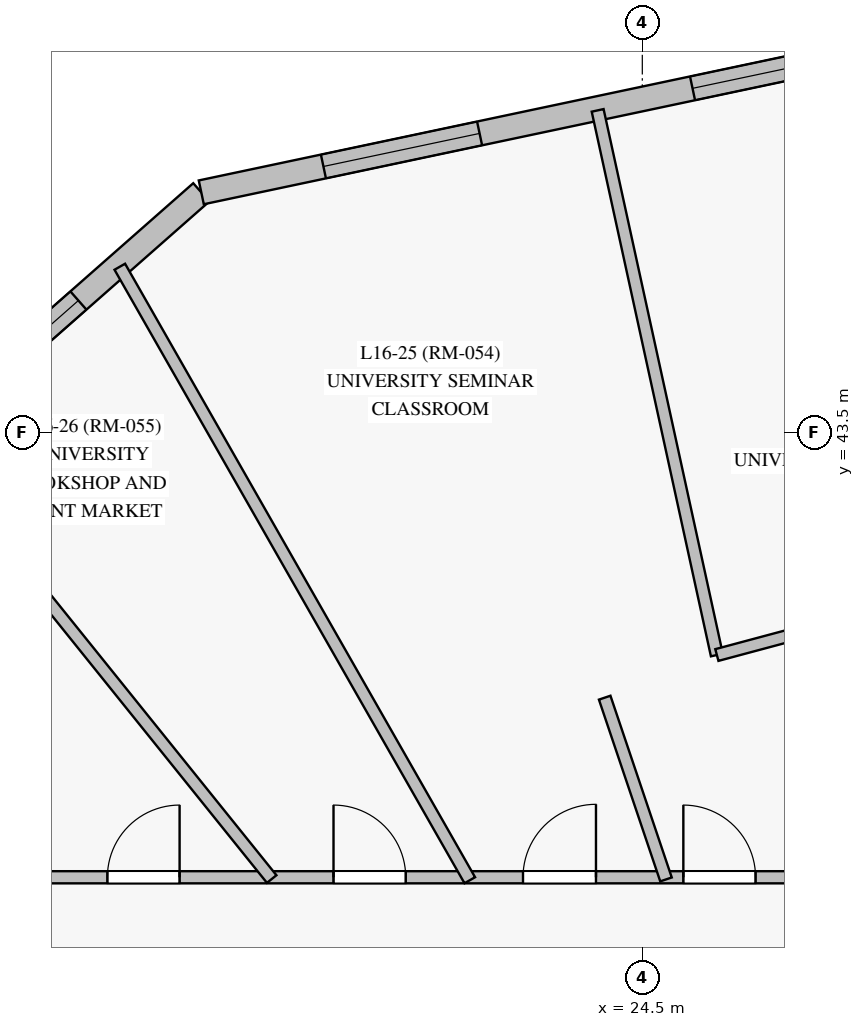
"""IFC4 building model, lengths in metres.
Left out: names, types, materials, properties, quantities, classifications, styles, units other than length and angle.
Written with IfcOpenShell. Run it as: python <this file> out.ifc"""

import sys

from ifc_helpers import new_model, si_unit, direction, frame, frame_2d, origin, origin_with_axes, place, context, subcontext, project, spatial, rectangle, extrude, source, transform, mapped, element, fill, save


model = new_model("IFC4")
c1 = context("Model", 3, precision=1e-05, world=origin(), true_north=direction((0.0, 1.0)))
c2 = subcontext(c1, "Body", "Model", "MODEL_VIEW")
j1 = project(units=[si_unit("LENGTHUNIT", "METRE"), si_unit("PLANEANGLEUNIT", "RADIAN")], contexts=[c1])
p1 = place(None, origin())
s1 = spatial("IfcSite", under=j1, at=p1, CompositionType="ELEMENT")
p2 = place(p1, origin())
s2 = spatial("IfcBuilding", under=s1, at=p2, CompositionType="ELEMENT")
p3 = place(p2, frame((0.0, 0.0, 62.5)))
s3 = spatial("IfcBuildingStorey", under=s2, at=p3, CompositionType="ELEMENT", Elevation=62.5)
p4 = place(p3, frame((18.698, 46.661, 0.0), z_axis=(0.0, 0.0, 1.0), x_axis=(-0.750570189691, -0.66079073113, 0.0)))
e1 = element("IfcWall", 1, at=p4, inside=s3, PredefinedType="SOLIDWALL", context=c2, shape_type="SweptSolid", body=[
    extrude(rectangle(XDim=11.93, YDim=0.32, at=frame_2d((5.965, 0.0))), origin(), (0.0, 0.0, 1.0), 3.35),
])
p5 = place(p4, frame((2.154, 0.0, 0.85)))
e2 = element("IfcOpeningElement", 2, at=p5, cuts=e1, PredefinedType="OPENING", context=c2, shape_type="SweptSolid", body=[
    extrude(rectangle(XDim=2.1, YDim=1.95, at=frame_2d((1.05, 0.975))), frame((0.0, 0.17, 0.0), z_axis=(0.0, -1.0, 0.0), x_axis=(1.0, 0.0, 0.0)), (0.0, 0.0, 1.0), 0.34),
])
p6 = place(p4, frame((7.36, 0.0, 0.85)))
e3 = element("IfcOpeningElement", 3, at=p6, cuts=e1, PredefinedType="OPENING", context=c2, shape_type="SweptSolid", body=[
    extrude(rectangle(XDim=2.1, YDim=1.95, at=frame_2d((1.05, 0.975))), frame((0.0, 0.17, 0.0), z_axis=(0.0, -1.0, 0.0), x_axis=(1.0, 0.0, 0.0)), (0.0, 0.0, 1.0), 0.34),
])
p7 = place(p3, frame((33.236, 49.739, 0.0), z_axis=(0.0, 0.0, 1.0), x_axis=(-0.9783201392, -0.207098298485, 0.0)))
e4 = element("IfcWall", 4, at=p7, inside=s3, PredefinedType="SOLIDWALL", context=c2, shape_type="SweptSolid", body=[
    extrude(rectangle(XDim=14.861, YDim=0.32, at=frame_2d((7.43, 0.0))), origin(), (0.0, 0.0, 1.0), 3.35),
])
p8 = place(p7, frame((2.133, 0.0, 0.85)))
e5 = element("IfcOpeningElement", 5, at=p8, cuts=e4, PredefinedType="OPENING", context=c2, shape_type="SweptSolid", body=[
    extrude(rectangle(XDim=2.1, YDim=1.95, at=frame_2d((1.05, 0.975))), frame((0.0, 0.17, 0.0), z_axis=(0.0, -1.0, 0.0), x_axis=(1.0, 0.0, 0.0)), (0.0, 0.0, 1.0), 0.34),
])
p9 = place(p7, frame((6.155, 0.0, 0.85)))
e6 = element("IfcOpeningElement", 6, at=p9, cuts=e4, PredefinedType="OPENING", context=c2, shape_type="SweptSolid", body=[
    extrude(rectangle(XDim=2.1, YDim=1.95, at=frame_2d((1.05, 0.975))), frame((0.0, 0.17, 0.0), z_axis=(0.0, -1.0, 0.0), x_axis=(1.0, 0.0, 0.0)), (0.0, 0.0, 1.0), 0.34),
])
p10 = place(p7, frame((11.118, 0.0, 0.85)))
e7 = element("IfcOpeningElement", 7, at=p10, cuts=e4, PredefinedType="OPENING", context=c2, shape_type="SweptSolid", body=[
    extrude(rectangle(XDim=2.1, YDim=1.95, at=frame_2d((1.05, 0.975))), frame((0.0, 0.17, 0.0), z_axis=(0.0, -1.0, 0.0), x_axis=(1.0, 0.0, 0.0)), (0.0, 0.0, 1.0), 0.34),
])
p11 = place(p3, frame((10.5, 37.65, 0.0), z_axis=(0.0, 0.0, 1.0), x_axis=(1.0, 0.0, 0.0)))
e8 = element("IfcWall", 8, at=p11, inside=s3, PredefinedType="PARTITIONING", context=c2, shape_type="SweptSolid", body=[
    extrude(rectangle(XDim=29.75, YDim=0.16, at=frame_2d((14.875, 0.0))), origin(), (0.0, 0.0, 1.0), 2.75),
])
p12 = place(p11, frame((27.99, 0.0, 0.0)))
e9 = element("IfcOpeningElement", 9, at=p12, cuts=e8, PredefinedType="OPENING", context=c2, shape_type="SweptSolid", body=[
    extrude(rectangle(XDim=0.96, YDim=2.15, at=frame_2d((0.48, 1.075))), frame((0.0, 0.09, 0.0), z_axis=(0.0, -1.0, 0.0), x_axis=(1.0, 0.0, 0.0)), (0.0, 0.0, 1.0), 0.18),
])
p13 = place(p11, frame((25.342, 0.0, 0.0)))
e10 = element("IfcOpeningElement", 10, at=p13, cuts=e8, PredefinedType="OPENING", context=c2, shape_type="SweptSolid", body=[
    extrude(rectangle(XDim=0.95, YDim=2.15, at=frame_2d((0.475, 1.075))), frame((0.0, 0.09, 0.0), z_axis=(0.0, -1.0, 0.0), x_axis=(1.0, 0.0, 0.0)), (0.0, 0.0, 1.0), 0.18),
])
p14 = place(p11, frame((22.028, 0.0, 0.0)))
e11 = element("IfcOpeningElement", 11, at=p14, cuts=e8, PredefinedType="OPENING", context=c2, shape_type="SweptSolid", body=[
    extrude(rectangle(XDim=0.95, YDim=2.15, at=frame_2d((0.475, 1.075))), frame((0.0, 0.09, 0.0), z_axis=(0.0, -1.0, 0.0), x_axis=(1.0, 0.0, 0.0)), (0.0, 0.0, 1.0), 0.18),
])
p15 = place(p11, frame((20.31, 0.0, 0.0)))
e12 = element("IfcOpeningElement", 12, at=p15, cuts=e8, PredefinedType="OPENING", context=c2, shape_type="SweptSolid", body=[
    extrude(rectangle(XDim=0.96, YDim=2.15, at=frame_2d((0.48, 1.075))), frame((0.0, 0.09, 0.0), z_axis=(0.0, -1.0, 0.0), x_axis=(1.0, 0.0, 0.0)), (0.0, 0.0, 1.0), 0.18),
])
p16 = place(p11, frame((14.54, 0.0, 0.0)))
e13 = element("IfcOpeningElement", 13, at=p16, cuts=e8, PredefinedType="OPENING", context=c2, shape_type="SweptSolid", body=[
    extrude(rectangle(XDim=0.95, YDim=2.15, at=frame_2d((0.475, 1.075))), frame((0.0, 0.09, 0.0), z_axis=(0.0, -1.0, 0.0), x_axis=(1.0, 0.0, 0.0)), (0.0, 0.0, 1.0), 0.18),
])
p17 = place(p11, frame((12.43, 0.0, 0.0)))
e14 = element("IfcOpeningElement", 14, at=p17, cuts=e8, PredefinedType="OPENING", context=c2, shape_type="SweptSolid", body=[
    extrude(rectangle(XDim=0.96, YDim=2.15, at=frame_2d((0.48, 1.075))), frame((0.0, 0.09, 0.0), z_axis=(0.0, -1.0, 0.0), x_axis=(1.0, 0.0, 0.0)), (0.0, 0.0, 1.0), 0.18),
])
p18 = place(p11, frame((9.938, 0.0, 0.0)))
e15 = element("IfcOpeningElement", 15, at=p18, cuts=e8, PredefinedType="OPENING", context=c2, shape_type="SweptSolid", body=[
    extrude(rectangle(XDim=0.95, YDim=2.15, at=frame_2d((0.475, 1.075))), frame((0.0, 0.09, 0.0), z_axis=(0.0, -1.0, 0.0), x_axis=(1.0, 0.0, 0.0)), (0.0, 0.0, 1.0), 0.18),
])
p19 = place(p11, frame((6.962, 0.0, 0.0)))
e16 = element("IfcOpeningElement", 16, at=p19, cuts=e8, PredefinedType="OPENING", context=c2, shape_type="SweptSolid", body=[
    extrude(rectangle(XDim=0.95, YDim=2.15, at=frame_2d((0.475, 1.075))), frame((0.0, 0.09, 0.0), z_axis=(0.0, -1.0, 0.0), x_axis=(1.0, 0.0, 0.0)), (0.0, 0.0, 1.0), 0.18),
])
p20 = place(p3, frame((22.23, 37.611, 0.0), z_axis=(0.0, 0.0, 1.0), x_axis=(-0.49551633336, 0.868598620407, 0.0)))
e17 = element("IfcWall", 17, at=p20, inside=s3, PredefinedType="PARTITIONING", context=c2, shape_type="SweptSolid", body=[
    extrude(rectangle(XDim=9.292, YDim=0.16, at=frame_2d((4.646, 0.0))), origin(), (0.0, 0.0, 1.0), 3.35),
])
p21 = place(p3, frame((19.624, 37.627, 0.0), z_axis=(0.0, 0.0, 1.0), x_axis=(-0.626896706466, 0.779102380578, 0.0)))
e18 = element("IfcWall", 18, at=p21, inside=s3, PredefinedType="PARTITIONING", context=c2, shape_type="SweptSolid", body=[
    extrude(rectangle(XDim=7.375, YDim=0.16, at=frame_2d((3.688, 0.0))), origin(), (0.0, 0.0, 1.0), 3.35),
])
p22 = place(p3, frame((25.481, 40.574, 0.0), z_axis=(0.0, 0.0, 1.0), x_axis=(-0.213820958003, 0.976872866815, 0.0)))
e19 = element("IfcWall", 19, at=p22, inside=s3, PredefinedType="PARTITIONING", context=c2, shape_type="SweptSolid", body=[
    extrude(rectangle(XDim=7.335, YDim=0.16, at=frame_2d((3.667, 0.0))), origin(), (0.0, 0.0, 1.0), 3.35),
])
p23 = place(p3, frame((28.5, 41.383, 0.0), z_axis=(0.0, 0.0, 1.0), x_axis=(-0.965934803012, -0.258785541192, 0.0)))
e20 = element("IfcWall", 20, at=p23, inside=s3, PredefinedType="PARTITIONING", context=c2, shape_type="SweptSolid", body=[
    extrude(rectangle(XDim=3.125, YDim=0.16, at=frame_2d((1.563, 0.0))), origin(), (0.0, 0.0, 1.0), 2.75),
])
p24 = place(p3, frame((24.812, 37.622, 0.0), z_axis=(0.0, 0.0, 1.0), x_axis=(-0.319650532491, 0.947535507028, 0.0)))
e21 = element("IfcWall", 21, at=p24, inside=s3, PredefinedType="PARTITIONING", context=c2, shape_type="SweptSolid", body=[
    extrude(rectangle(XDim=2.523, YDim=0.16, at=frame_2d((1.262, 0.0))), origin(), (0.0, 0.0, 1.0), 3.35),
])
m1 = source(origin_with_axes(), c2, "Body", "SweptSolid", [
    extrude(rectangle(XDim=2.1, YDim=1.95, at=frame_2d((1.05, 0.975))), frame((0.0, 0.03, 0.0), z_axis=(0.0, -1.0, 0.0), x_axis=(1.0, 0.0, 0.0)), (0.0, 0.0, 1.0), 0.06),
])
p25 = place(p5, origin())
e22 = element("IfcWindow", 22, at=p25, inside=s3, PartitioningType="SINGLE_PANEL", PredefinedType="WINDOW", context=c2, shape_type="MappedRepresentation", body=[
    mapped(m1, transform((0.0, 0.0, 0.0), scale=1.0)),
])
fill(e2, e22)
p26 = place(p9, origin())
e23 = element("IfcWindow", 23, at=p26, inside=s3, PartitioningType="SINGLE_PANEL", PredefinedType="WINDOW", context=c2, shape_type="MappedRepresentation", body=[
    mapped(m1, transform((0.0, 0.0, 0.0), scale=1.0)),
])
fill(e6, e23)
p27 = place(p10, origin())
e24 = element("IfcWindow", 24, at=p27, inside=s3, PartitioningType="SINGLE_PANEL", PredefinedType="WINDOW", context=c2, shape_type="MappedRepresentation", body=[
    mapped(m1, transform((0.0, 0.0, 0.0), scale=1.0)),
])
fill(e7, e24)
m2 = source(origin_with_axes(), c2, "Body", "SweptSolid", [
    extrude(rectangle(XDim=0.95, YDim=2.15, at=frame_2d((0.475, 1.075))), frame((0.0, 0.025, 0.0), z_axis=(0.0, -1.0, 0.0), x_axis=(1.0, 0.0, 0.0)), (0.0, 0.0, 1.0), 0.05),
])
p28 = place(p16, origin())
e25 = element("IfcDoor", 25, at=p28, inside=s3, OperationType="SINGLE_SWING_LEFT", PredefinedType="DOOR", context=c2, shape_type="MappedRepresentation", body=[
    mapped(m2, transform((0.0, 0.0, 0.0), scale=1.0)),
])
fill(e13, e25)
m3 = source(origin_with_axes(), c2, "Body", "SweptSolid", [
    extrude(rectangle(XDim=0.96, YDim=2.15, at=frame_2d((0.48, 1.075))), frame((0.0, 0.025, 0.0), z_axis=(0.0, -1.0, 0.0), x_axis=(1.0, 0.0, 0.0)), (0.0, 0.0, 1.0), 0.05),
])
p29 = place(p17, origin())
e26 = element("IfcDoor", 26, at=p29, inside=s3, OperationType="SINGLE_SWING_RIGHT", PredefinedType="DOOR", context=c2, shape_type="MappedRepresentation", body=[
    mapped(m3, transform((0.0, 0.0, 0.0), scale=1.0)),
])
fill(e14, e26)
p30 = place(p18, origin())
e27 = element("IfcDoor", 27, at=p30, inside=s3, OperationType="SINGLE_SWING_LEFT", PredefinedType="DOOR", context=c2, shape_type="MappedRepresentation", body=[
    mapped(m2, transform((0.0, 0.0, 0.0), scale=1.0)),
])
fill(e15, e27)
p31 = place(p19, origin())
e28 = element("IfcDoor", 28, at=p31, inside=s3, OperationType="SINGLE_SWING_RIGHT", PredefinedType="DOOR", context=c2, shape_type="MappedRepresentation", body=[
    mapped(m2, transform((0.0, 0.0, 0.0), scale=1.0)),
])
fill(e16, e28)
save(model, sys.argv[1])
